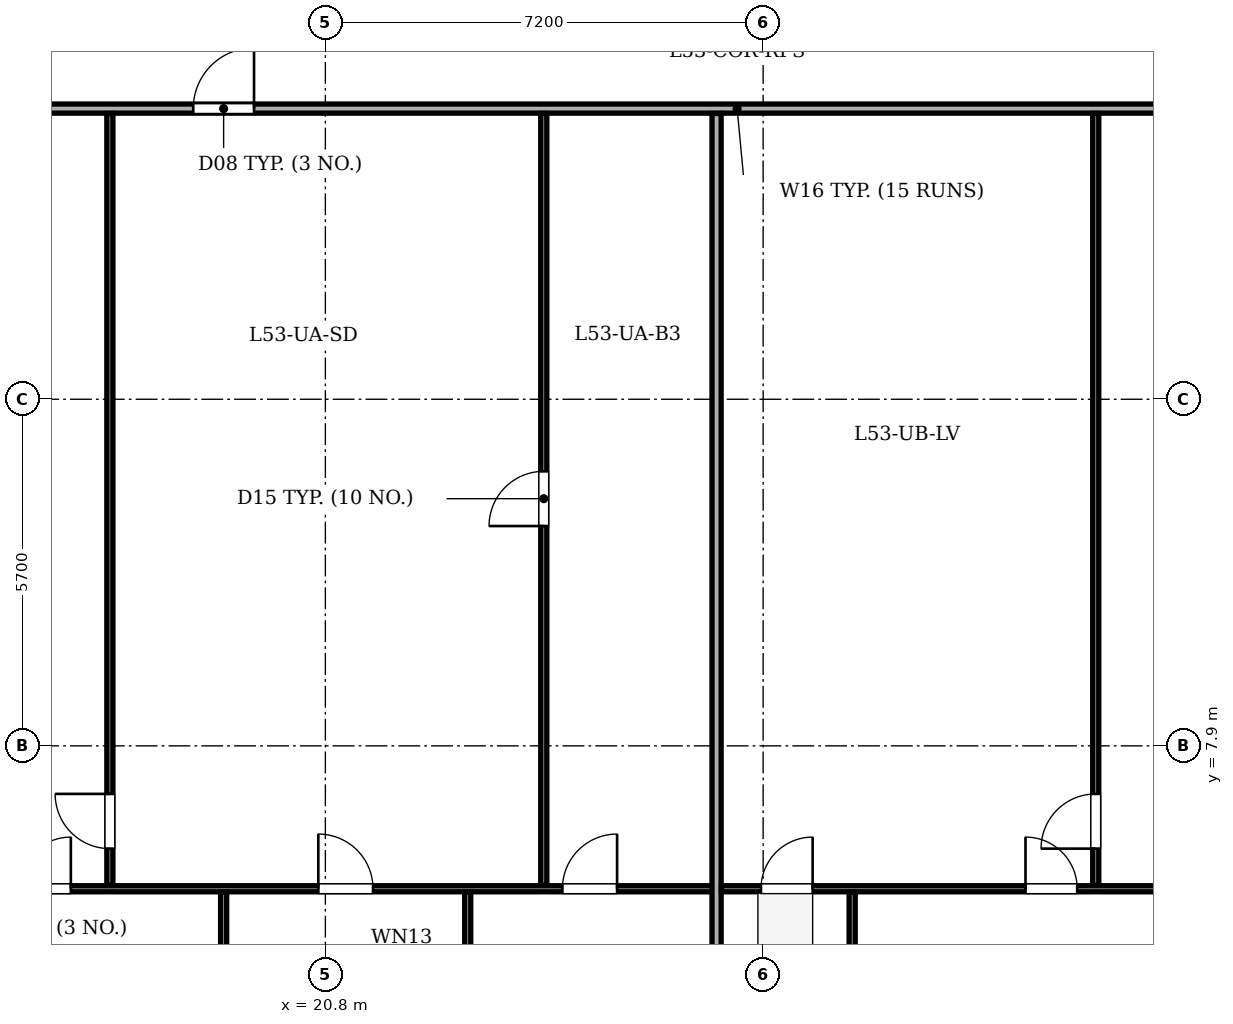
"""IFC4 building model, lengths in metres.
Left out: names, types, materials, properties, quantities, classifications, styles, units other than length and angle.
Written with IfcOpenShell. Run it as: python <this file> out.ifc"""

import sys

from ifc_helpers import new_model, si_unit, direction, frame, frame_2d, origin, place, context, subcontext, project, spatial, rectangle, extrude, element, fill, save


model = new_model("IFC4")
c1 = context("Model", 3, precision=1e-05, world=origin(), true_north=direction((0.0, 1.0)))
c2 = subcontext(c1, "Body", "Model", "MODEL_VIEW")
j1 = project(units=[si_unit("LENGTHUNIT", "METRE"), si_unit("PLANEANGLEUNIT", "RADIAN")], contexts=[c1])
p1 = place(None, origin())
s1 = spatial("IfcSite", under=j1, at=p1, CompositionType="ELEMENT")
p2 = place(p1, origin())
s2 = spatial("IfcBuilding", under=s1, at=p2, CompositionType="ELEMENT")
p3 = place(p2, frame((0.0, 0.0, 207.5)))
s3 = spatial("IfcBuildingStorey", under=s2, at=p3, CompositionType="ELEMENT", Elevation=207.5)
p4 = place(p3, frame((10.9, 18.38, 0.0), z_axis=(0.0, 0.0, 1.0), x_axis=(1.0, 0.0, 0.0)))
e1 = element("IfcWall", 1, at=p4, inside=s3, PredefinedType="PARTITIONING", context=c2, shape_type="SweptSolid", body=[
    extrude(rectangle(XDim=34.02, YDim=0.15, at=frame_2d((17.01, 0.0))), origin(), (0.0, 0.0, 1.0), 3.1),
])
p5 = place(p4, frame((7.727, 0.0, 0.0)))
e2 = element("IfcOpeningElement", 2, at=p5, cuts=e1, PredefinedType="OPENING", context=c2, shape_type="SweptSolid", body=[
    extrude(rectangle(XDim=1.0, YDim=2.1, at=frame_2d((0.5, 1.05))), frame((0.0, 0.085, 0.0), z_axis=(0.0, -1.0, 0.0), x_axis=(1.0, 0.0, 0.0)), (0.0, 0.0, 1.0), 0.17),
])
p6 = place(p4, frame((24.617, 0.0, 0.0)))
e3 = element("IfcOpeningElement", 3, at=p6, cuts=e1, PredefinedType="OPENING", context=c2, shape_type="SweptSolid", body=[
    extrude(rectangle(XDim=1.0, YDim=2.1, at=frame_2d((0.5, 1.05))), frame((0.0, 0.085, 0.0), z_axis=(0.0, -1.0, 0.0), x_axis=(1.0, 0.0, 0.0)), (0.0, 0.0, 1.0), 0.17),
])
p7 = place(p3, frame((11.1, 5.55, 0.0), z_axis=(0.0, 0.0, 1.0), x_axis=(1.0, 0.0, 0.0)))
e4 = element("IfcWall", 4, at=p7, inside=s3, PredefinedType="PARTITIONING", context=c2, shape_type="SweptSolid", body=[
    extrude(rectangle(XDim=16.174, YDim=0.1, at=frame_2d((8.087, 0.0))), origin(), (0.0, 0.0, 1.0), 3.1),
])
p8 = place(p7, frame((0.65, 0.0, 0.0)))
e5 = element("IfcOpeningElement", 5, at=p8, cuts=e4, PredefinedType="OPENING", context=c2, shape_type="SweptSolid", body=[
    extrude(rectangle(XDim=0.85, YDim=2.05, at=frame_2d((0.425, 1.025))), frame((0.0, 0.06, 0.0), z_axis=(0.0, -1.0, 0.0), x_axis=(1.0, 0.0, 0.0)), (0.0, 0.0, 1.0), 0.12),
])
p9 = place(p7, frame((4.664, 0.0, 0.0)))
e6 = element("IfcOpeningElement", 6, at=p9, cuts=e4, PredefinedType="OPENING", context=c2, shape_type="SweptSolid", body=[
    extrude(rectangle(XDim=0.85, YDim=2.05, at=frame_2d((0.425, 1.025))), frame((0.0, 0.06, 0.0), z_axis=(0.0, -1.0, 0.0), x_axis=(1.0, 0.0, 0.0)), (0.0, 0.0, 1.0), 0.12),
])
p10 = place(p7, frame((9.584, 0.0, 0.0)))
e7 = element("IfcOpeningElement", 7, at=p10, cuts=e4, PredefinedType="OPENING", context=c2, shape_type="SweptSolid", body=[
    extrude(rectangle(XDim=0.9, YDim=2.05, at=frame_2d((0.45, 1.025))), frame((0.0, 0.06, 0.0), z_axis=(0.0, -1.0, 0.0), x_axis=(1.0, 0.0, 0.0)), (0.0, 0.0, 1.0), 0.12),
])
p11 = place(p7, frame((13.598, 0.0, 0.0)))
e8 = element("IfcOpeningElement", 8, at=p11, cuts=e4, PredefinedType="OPENING", context=c2, shape_type="SweptSolid", body=[
    extrude(rectangle(XDim=0.9, YDim=2.05, at=frame_2d((0.45, 1.025))), frame((0.0, 0.06, 0.0), z_axis=(0.0, -1.0, 0.0), x_axis=(1.0, 0.0, 0.0)), (0.0, 0.0, 1.0), 0.12),
])
p12 = place(p3, frame((24.392, 5.605, 0.0), z_axis=(0.0, 0.0, 1.0), x_axis=(0.0, 1.0, 0.0)))
e9 = element("IfcWall", 9, at=p12, inside=s3, PredefinedType="PARTITIONING", context=c2, shape_type="SweptSolid", body=[
    extrude(rectangle(XDim=12.695, YDim=0.1, at=frame_2d((6.348, 0.0))), origin(), (0.0, 0.0, 1.0), 3.1),
])
p13 = place(p12, frame((5.91, 0.0, 0.0)))
e10 = element("IfcOpeningElement", 10, at=p13, cuts=e9, PredefinedType="OPENING", context=c2, shape_type="SweptSolid", body=[
    extrude(rectangle(XDim=0.9, YDim=2.05, at=frame_2d((0.45, 1.025))), frame((0.0, 0.06, 0.0), z_axis=(0.0, -1.0, 0.0), x_axis=(1.0, 0.0, 0.0)), (0.0, 0.0, 1.0), 0.12),
])
p14 = place(p3, frame((17.256, 5.605, 0.0), z_axis=(0.0, 0.0, 1.0), x_axis=(0.0, 1.0, 0.0)))
e11 = element("IfcWall", 11, at=p14, inside=s3, PredefinedType="PARTITIONING", context=c2, shape_type="SweptSolid", body=[
    extrude(rectangle(XDim=12.695, YDim=0.1, at=frame_2d((6.348, 0.0))), origin(), (0.0, 0.0, 1.0), 3.1),
])
p15 = place(p14, frame((0.605, 0.0, 0.0)))
e12 = element("IfcOpeningElement", 12, at=p15, cuts=e11, PredefinedType="OPENING", context=c2, shape_type="SweptSolid", body=[
    extrude(rectangle(XDim=0.9, YDim=2.05, at=frame_2d((0.45, 1.025))), frame((0.0, 0.06, 0.0), z_axis=(0.0, -1.0, 0.0), x_axis=(1.0, 0.0, 0.0)), (0.0, 0.0, 1.0), 0.12),
])
for number, where, z_axis, x_axis in (
    (13, (19.127, 3.045, 0.0), (0.0, 0.0, 1.0), (0.0, 1.0, 0.0)),
    (14, (23.141, 3.045, 0.0), (0.0, 0.0, 1.0), (0.0, 1.0, 0.0)),
):
    element("IfcWall", number, at=place(p3, frame(where, z_axis=z_axis, x_axis=x_axis)), inside=s3, PredefinedType="PARTITIONING", context=c2, shape_type="SweptSolid", body=[
        extrude(rectangle(XDim=2.45, YDim=0.1, at=frame_2d((1.225, 0.0))), origin(), (0.0, 0.0, 1.0), 3.1),
    ])
p16 = place(p3, frame((27.234, 3.045, 0.0), z_axis=(0.0, 0.0, 1.0), x_axis=(0.0, 1.0, 0.0)))
e15 = element("IfcWall", 15, at=p16, inside=s3, PredefinedType="PARTITIONING", context=c2, shape_type="SweptSolid", body=[
    extrude(rectangle(XDim=15.255, YDim=0.15, at=frame_2d((7.627, 0.0))), origin(), (0.0, 0.0, 1.0), 3.1),
])
p17 = place(p3, frame((27.314, 5.55, 0.0), z_axis=(0.0, 0.0, 1.0), x_axis=(1.0, 0.0, 0.0)))
e16 = element("IfcWall", 16, at=p17, inside=s3, PredefinedType="PARTITIONING", context=c2, shape_type="SweptSolid", body=[
    extrude(rectangle(XDim=17.526, YDim=0.1, at=frame_2d((8.763, 0.0))), origin(), (0.0, 0.0, 1.0), 3.1),
])
p18 = place(p17, frame((0.65, 0.0, 0.0)))
e17 = element("IfcOpeningElement", 17, at=p18, cuts=e16, PredefinedType="OPENING", context=c2, shape_type="SweptSolid", body=[
    extrude(rectangle(XDim=0.85, YDim=2.05, at=frame_2d((0.425, 1.025))), frame((0.0, 0.06, 0.0), z_axis=(0.0, -1.0, 0.0), x_axis=(1.0, 0.0, 0.0)), (0.0, 0.0, 1.0), 0.12),
])
p19 = place(p17, frame((5.001, 0.0, 0.0)))
e18 = element("IfcOpeningElement", 18, at=p19, cuts=e16, PredefinedType="OPENING", context=c2, shape_type="SweptSolid", body=[
    extrude(rectangle(XDim=0.85, YDim=2.05, at=frame_2d((0.425, 1.025))), frame((0.0, 0.06, 0.0), z_axis=(0.0, -1.0, 0.0), x_axis=(1.0, 0.0, 0.0)), (0.0, 0.0, 1.0), 0.12),
])
p20 = place(p17, frame((10.428, 0.0, 0.0)))
e19 = element("IfcOpeningElement", 19, at=p20, cuts=e16, PredefinedType="OPENING", context=c2, shape_type="SweptSolid", body=[
    extrude(rectangle(XDim=0.9, YDim=2.05, at=frame_2d((0.45, 1.025))), frame((0.0, 0.06, 0.0), z_axis=(0.0, -1.0, 0.0), x_axis=(1.0, 0.0, 0.0)), (0.0, 0.0, 1.0), 0.12),
])
p21 = place(p17, frame((14.78, 0.0, 0.0)))
e20 = element("IfcOpeningElement", 20, at=p21, cuts=e16, PredefinedType="OPENING", context=c2, shape_type="SweptSolid", body=[
    extrude(rectangle(XDim=0.9, YDim=2.05, at=frame_2d((0.45, 1.025))), frame((0.0, 0.06, 0.0), z_axis=(0.0, -1.0, 0.0), x_axis=(1.0, 0.0, 0.0)), (0.0, 0.0, 1.0), 0.12),
])
p22 = place(p3, frame((33.47, 5.605, 0.0), z_axis=(0.0, 0.0, 1.0), x_axis=(0.0, 1.0, 0.0)))
e21 = element("IfcWall", 21, at=p22, inside=s3, PredefinedType="PARTITIONING", context=c2, shape_type="SweptSolid", body=[
    extrude(rectangle(XDim=12.695, YDim=0.1, at=frame_2d((6.348, 0.0))), origin(), (0.0, 0.0, 1.0), 2.725),
])
p23 = place(p22, frame((0.605, 0.0, 0.0)))
e22 = element("IfcOpeningElement", 22, at=p23, cuts=e21, PredefinedType="OPENING", context=c2, shape_type="SweptSolid", body=[
    extrude(rectangle(XDim=0.9, YDim=2.05, at=frame_2d((0.45, 1.025))), frame((0.0, 0.06, 0.0), z_axis=(0.0, -1.0, 0.0), x_axis=(1.0, 0.0, 0.0)), (0.0, 0.0, 1.0), 0.12),
])
p24 = place(p3, frame((29.464, 3.045, 0.0), z_axis=(0.0, 0.0, 1.0), x_axis=(0.0, 1.0, 0.0)))
e23 = element("IfcWall", 23, at=p24, inside=s3, PredefinedType="PARTITIONING", context=c2, shape_type="SweptSolid", body=[
    extrude(rectangle(XDim=2.45, YDim=0.1, at=frame_2d((1.225, 0.0))), origin(), (0.0, 0.0, 1.0), 3.1),
])
p25 = place(p5, origin())
e24 = element("IfcDoor", 24, at=p25, inside=s3, OperationType="SINGLE_SWING_RIGHT", PredefinedType="DOOR", context=c2, shape_type="SweptSolid", body=[
    extrude(rectangle(XDim=1.0, YDim=2.1, at=frame_2d((0.5, 1.05))), frame((0.0, 0.025, 0.0), z_axis=(0.0, -1.0, 0.0), x_axis=(1.0, 0.0, 0.0)), (0.0, 0.0, 1.0), 0.05),
])
fill(e2, e24)
p26 = place(p13, origin())
e25 = element("IfcDoor", 25, at=p26, inside=s3, OperationType="SINGLE_SWING_LEFT", PredefinedType="DOOR", context=c2, shape_type="SweptSolid", body=[
    extrude(rectangle(XDim=0.9, YDim=2.05, at=frame_2d((0.45, 1.025))), frame((0.0, 0.025, 0.0), z_axis=(0.0, -1.0, 0.0), x_axis=(1.0, 0.0, 0.0)), (0.0, 0.0, 1.0), 0.05),
])
fill(e10, e25)
p27 = place(p15, origin())
e26 = element("IfcDoor", 26, at=p27, inside=s3, OperationType="SINGLE_SWING_RIGHT", PredefinedType="DOOR", context=c2, shape_type="SweptSolid", body=[
    extrude(rectangle(XDim=0.9, YDim=2.05, at=frame_2d((0.45, 1.025))), frame((0.0, 0.025, 0.0), z_axis=(0.0, -1.0, 0.0), x_axis=(1.0, 0.0, 0.0)), (0.0, 0.0, 1.0), 0.05),
])
fill(e12, e26)
p28 = place(p9, origin())
e27 = element("IfcDoor", 27, at=p28, inside=s3, OperationType="SINGLE_SWING_RIGHT", PredefinedType="DOOR", context=c2, shape_type="SweptSolid", body=[
    extrude(rectangle(XDim=0.85, YDim=2.05, at=frame_2d((0.425, 1.025))), frame((0.0, 0.025, 0.0), z_axis=(0.0, -1.0, 0.0), x_axis=(1.0, 0.0, 0.0)), (0.0, 0.0, 1.0), 0.05),
])
fill(e6, e27)
p29 = place(p10, origin())
e28 = element("IfcDoor", 28, at=p29, inside=s3, OperationType="SINGLE_SWING_LEFT", PredefinedType="DOOR", context=c2, shape_type="SweptSolid", body=[
    extrude(rectangle(XDim=0.9, YDim=2.05, at=frame_2d((0.45, 1.025))), frame((0.0, 0.025, 0.0), z_axis=(0.0, -1.0, 0.0), x_axis=(1.0, 0.0, 0.0)), (0.0, 0.0, 1.0), 0.05),
])
fill(e7, e28)
p30 = place(p11, origin())
e29 = element("IfcDoor", 29, at=p30, inside=s3, OperationType="SINGLE_SWING_RIGHT", PredefinedType="DOOR", context=c2, shape_type="SweptSolid", body=[
    extrude(rectangle(XDim=0.9, YDim=2.05, at=frame_2d((0.45, 1.025))), frame((0.0, 0.025, 0.0), z_axis=(0.0, -1.0, 0.0), x_axis=(1.0, 0.0, 0.0)), (0.0, 0.0, 1.0), 0.05),
])
fill(e8, e29)
p31 = place(p23, origin())
e30 = element("IfcDoor", 30, at=p31, inside=s3, OperationType="SINGLE_SWING_LEFT", PredefinedType="DOOR", context=c2, shape_type="SweptSolid", body=[
    extrude(rectangle(XDim=0.9, YDim=2.05, at=frame_2d((0.45, 1.025))), frame((0.0, 0.025, 0.0), z_axis=(0.0, -1.0, 0.0), x_axis=(1.0, 0.0, 0.0)), (0.0, 0.0, 1.0), 0.05),
])
fill(e22, e30)
p32 = place(p18, origin())
e31 = element("IfcDoor", 31, at=p32, inside=s3, OperationType="SINGLE_SWING_RIGHT", PredefinedType="DOOR", context=c2, shape_type="SweptSolid", body=[
    extrude(rectangle(XDim=0.85, YDim=2.05, at=frame_2d((0.425, 1.025))), frame((0.0, 0.025, 0.0), z_axis=(0.0, -1.0, 0.0), x_axis=(1.0, 0.0, 0.0)), (0.0, 0.0, 1.0), 0.05),
])
fill(e17, e31)
p33 = place(p19, origin())
e32 = element("IfcDoor", 32, at=p33, inside=s3, OperationType="SINGLE_SWING_LEFT", PredefinedType="DOOR", context=c2, shape_type="SweptSolid", body=[
    extrude(rectangle(XDim=0.85, YDim=2.05, at=frame_2d((0.425, 1.025))), frame((0.0, 0.025, 0.0), z_axis=(0.0, -1.0, 0.0), x_axis=(1.0, 0.0, 0.0)), (0.0, 0.0, 1.0), 0.05),
])
fill(e18, e32)
save(model, sys.argv[1])
